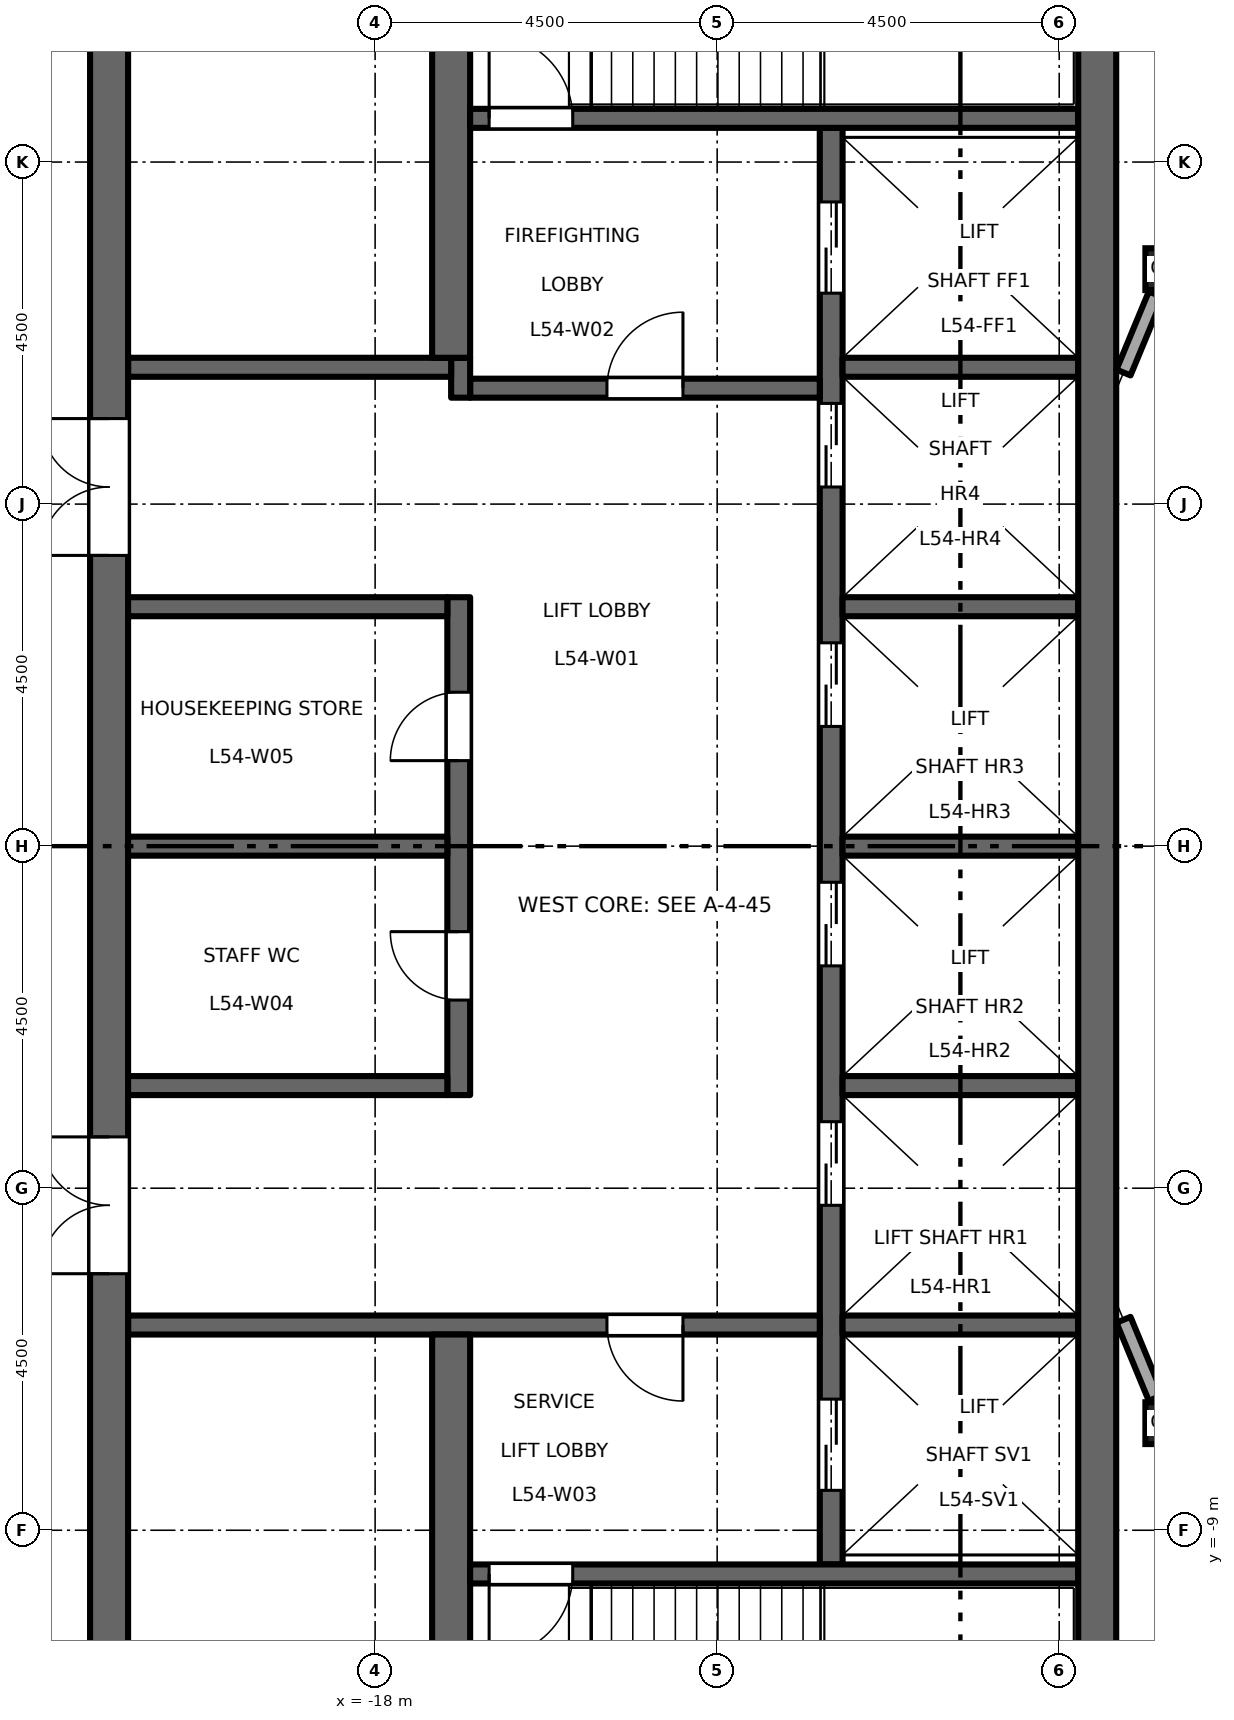
"""IFC4 building model, lengths in metres.
Left out: names, types, materials, properties, quantities, classifications, styles, units other than length and angle.
Written with IfcOpenShell. Run it as: python <this file> out.ifc"""

import sys

from ifc_helpers import new_model, si_unit, direction, frame, frame_2d, origin, origin_2d, place, context, subcontext, project, spatial, rectangle, hollow_rectangle, extrude, element, fill, save


model = new_model("IFC4")
c1 = context("Model", 3, precision=1e-05, world=origin(), true_north=direction((0.0, 1.0)))
c2 = subcontext(c1, "Body", "Model", "MODEL_VIEW")
j1 = project(units=[si_unit("LENGTHUNIT", "METRE"), si_unit("PLANEANGLEUNIT", "RADIAN")], contexts=[c1])
p1 = place(None, origin())
s1 = spatial("IfcSite", under=j1, at=p1, CompositionType="ELEMENT")
p2 = place(p1, origin())
s2 = spatial("IfcBuilding", under=s1, at=p2, CompositionType="ELEMENT")
p3 = place(p2, frame((0.0, 0.0, 251.2)))
s3 = spatial("IfcBuildingStorey", under=s2, at=p3, CompositionType="ELEMENT", Elevation=251.2)
for number, where, z_axis, x_axis in (
    (1, (-7.591, -7.591, 0.0), (0.0, 0.0, 1.0), (1.0, 0.0, 0.0)),
    (2, (-7.591, 7.591, 0.0), (0.0, 0.0, 1.0), (1.0, 0.0, 0.0)),
):
    element("IfcColumn", number, at=place(p3, frame(where, z_axis=z_axis, x_axis=x_axis)), inside=s3, PredefinedType="COLUMN", context=c2, shape_type="SweptSolid", body=[
        extrude(hollow_rectangle(XDim=0.55, YDim=0.55, WallThickness=0.028, at=origin_2d()), origin(), (0.0, 0.0, 1.0), 4.5),
    ])
p4 = place(p3, frame((-12.0, -9.45, 0.0), z_axis=(0.0, 0.0, 1.0), x_axis=(0.0, 1.0, 0.0)))
e3 = element("IfcWall", 3, at=p4, inside=s3, PredefinedType="SHEAR", context=c2, shape_type="SweptSolid", body=[
    extrude(rectangle(XDim=18.9, YDim=0.3, at=frame_2d((9.45, 0.0))), origin(), (0.0, 0.0, 1.0), 4.35),
])
p5 = place(p4, frame((4.725, 0.0, 0.0)))
e4 = element("IfcOpeningElement", 4, at=p5, cuts=e3, PredefinedType="OPENING", context=c2, shape_type="SweptSolid", body=[
    extrude(rectangle(XDim=1.1, YDim=2.1, at=frame_2d((0.55, 1.05))), frame((0.0, 0.16, 0.0), z_axis=(0.0, -1.0, 0.0), x_axis=(1.0, 0.0, 0.0)), (0.0, 0.0, 1.0), 0.32),
])
p6 = place(p4, frame((7.875, 0.0, 0.0)))
e5 = element("IfcOpeningElement", 5, at=p6, cuts=e3, PredefinedType="OPENING", context=c2, shape_type="SweptSolid", body=[
    extrude(rectangle(XDim=1.1, YDim=2.1, at=frame_2d((0.55, 1.05))), frame((0.0, 0.16, 0.0), z_axis=(0.0, -1.0, 0.0), x_axis=(1.0, 0.0, 0.0)), (0.0, 0.0, 1.0), 0.32),
])
p7 = place(p4, frame((11.025, 0.0, 0.0)))
e6 = element("IfcOpeningElement", 6, at=p7, cuts=e3, PredefinedType="OPENING", context=c2, shape_type="SweptSolid", body=[
    extrude(rectangle(XDim=1.1, YDim=2.1, at=frame_2d((0.55, 1.05))), frame((0.0, 0.16, 0.0), z_axis=(0.0, -1.0, 0.0), x_axis=(1.0, 0.0, 0.0)), (0.0, 0.0, 1.0), 0.32),
])
p8 = place(p4, frame((14.175, 0.0, 0.0)))
e7 = element("IfcOpeningElement", 7, at=p8, cuts=e3, PredefinedType="OPENING", context=c2, shape_type="SweptSolid", body=[
    extrude(rectangle(XDim=1.1, YDim=2.1, at=frame_2d((0.55, 1.05))), frame((0.0, 0.16, 0.0), z_axis=(0.0, -1.0, 0.0), x_axis=(1.0, 0.0, 0.0)), (0.0, 0.0, 1.0), 0.32),
])
p9 = place(p4, frame((16.725, 0.0, 0.0)))
e8 = element("IfcOpeningElement", 8, at=p9, cuts=e3, PredefinedType="OPENING", context=c2, shape_type="SweptSolid", body=[
    extrude(rectangle(XDim=1.2, YDim=2.1, at=frame_2d((0.6, 1.05))), frame((0.0, 0.16, 0.0), z_axis=(0.0, -1.0, 0.0), x_axis=(1.0, 0.0, 0.0)), (0.0, 0.0, 1.0), 0.32),
])
p10 = place(p4, frame((0.975, 0.0, 0.0)))
e9 = element("IfcOpeningElement", 9, at=p10, cuts=e3, PredefinedType="OPENING", context=c2, shape_type="SweptSolid", body=[
    extrude(rectangle(XDim=1.2, YDim=2.1, at=frame_2d((0.6, 1.05))), frame((0.0, 0.16, 0.0), z_axis=(0.0, -1.0, 0.0), x_axis=(1.0, 0.0, 0.0)), (0.0, 0.0, 1.0), 0.32),
])
p11 = place(p3, frame((-12.15, 6.025, 0.0), z_axis=(0.0, 0.0, 1.0), x_axis=(-1.0, 0.0, 0.0)))
e10 = element("IfcWall", 10, at=p11, inside=s3, PredefinedType="SHEAR", context=c2, shape_type="SweptSolid", body=[
    extrude(rectangle(XDim=4.6, YDim=0.25, at=frame_2d((2.3, 0.0))), origin(), (0.0, 0.0, 1.0), 4.35),
])
p12 = place(p11, frame((1.8, 0.0, 0.0)))
e11 = element("IfcOpeningElement", 11, at=p12, cuts=e10, PredefinedType="OPENING", context=c2, shape_type="SweptSolid", body=[
    extrude(rectangle(XDim=1.0, YDim=2.1, at=frame_2d((0.5, 1.05))), frame((0.0, 0.135, 0.0), z_axis=(0.0, -1.0, 0.0), x_axis=(1.0, 0.0, 0.0)), (0.0, 0.0, 1.0), 0.27),
])
p13 = place(p3, frame((-16.875, 5.9, 0.0), z_axis=(0.0, 0.0, 1.0), x_axis=(0.0, 1.0, 0.0)))
e12 = element("IfcWall", 12, at=p13, inside=s3, PredefinedType="SHEAR", context=c2, shape_type="SweptSolid", body=[
    extrude(rectangle(XDim=0.525, YDim=0.25, at=frame_2d((0.263, 0.0))), origin(), (0.0, 0.0, 1.0), 4.35),
])
p14 = place(p3, frame((-17.0, 6.3, 0.0), z_axis=(0.0, 0.0, 1.0), x_axis=(-1.0, 0.0, 0.0)))
e13 = element("IfcWall", 13, at=p14, inside=s3, PredefinedType="SHEAR", context=c2, shape_type="SweptSolid", body=[
    extrude(rectangle(XDim=4.25, YDim=0.25, at=frame_2d((2.125, 0.0))), origin(), (0.0, 0.0, 1.0), 4.35),
])
p15 = place(p3, frame((-12.15, -6.3, 0.0), z_axis=(0.0, 0.0, 1.0), x_axis=(-1.0, 0.0, 0.0)))
e14 = element("IfcWall", 14, at=p15, inside=s3, PredefinedType="SHEAR", context=c2, shape_type="SweptSolid", body=[
    extrude(rectangle(XDim=9.1, YDim=0.25, at=frame_2d((4.55, 0.0))), origin(), (0.0, 0.0, 1.0), 4.35),
])
p16 = place(p15, frame((1.8, 0.0, 0.0)))
e15 = element("IfcOpeningElement", 15, at=p16, cuts=e14, PredefinedType="OPENING", context=c2, shape_type="SweptSolid", body=[
    extrude(rectangle(XDim=1.0, YDim=2.1, at=frame_2d((0.5, 1.05))), frame((0.0, 0.135, 0.0), z_axis=(0.0, -1.0, 0.0), x_axis=(1.0, 0.0, 0.0)), (0.0, 0.0, 1.0), 0.27),
])
p17 = place(p3, frame((-21.5, -13.0, 0.0), z_axis=(0.0, 0.0, 1.0), x_axis=(0.0, 1.0, 0.0)))
e16 = element("IfcWall", 16, at=p17, inside=s3, PredefinedType="SHEAR", context=c2, shape_type="SweptSolid", body=[
    extrude(rectangle(XDim=26.0, YDim=0.5, at=frame_2d((13.0, 0.0))), origin(), (0.0, 0.0, 1.0), 4.35),
])
p18 = place(p17, frame((16.825, 0.0, 0.0)))
e17 = element("IfcOpeningElement", 17, at=p18, cuts=e16, PredefinedType="OPENING", context=c2, shape_type="SweptSolid", body=[
    extrude(rectangle(XDim=1.8, YDim=2.1, at=frame_2d((0.9, 1.05))), frame((0.0, 0.26, 0.0), z_axis=(0.0, -1.0, 0.0), x_axis=(1.0, 0.0, 0.0)), (0.0, 0.0, 1.0), 0.52),
])
p19 = place(p17, frame((7.375, 0.0, 0.0)))
e18 = element("IfcOpeningElement", 18, at=p19, cuts=e16, PredefinedType="OPENING", context=c2, shape_type="SweptSolid", body=[
    extrude(rectangle(XDim=1.8, YDim=2.1, at=frame_2d((0.9, 1.05))), frame((0.0, 0.26, 0.0), z_axis=(0.0, -1.0, 0.0), x_axis=(1.0, 0.0, 0.0)), (0.0, 0.0, 1.0), 0.52),
])
p20 = place(p3, frame((-16.9, -3.275, 0.0), z_axis=(0.0, 0.0, 1.0), x_axis=(0.0, 1.0, 0.0)))
e19 = element("IfcWall", 19, at=p20, inside=s3, PredefinedType="SHEAR", context=c2, shape_type="SweptSolid", body=[
    extrude(rectangle(XDim=6.55, YDim=0.3, at=frame_2d((3.275, 0.0))), origin(), (0.0, 0.0, 1.0), 4.35),
])
p21 = place(p20, frame((1.25, 0.0, 0.0)))
e20 = element("IfcOpeningElement", 20, at=p21, cuts=e19, PredefinedType="OPENING", context=c2, shape_type="SweptSolid", body=[
    extrude(rectangle(XDim=0.9, YDim=2.1, at=frame_2d((0.45, 1.05))), frame((0.0, 0.16, 0.0), z_axis=(0.0, -1.0, 0.0), x_axis=(1.0, 0.0, 0.0)), (0.0, 0.0, 1.0), 0.32),
])
p22 = place(p20, frame((4.4, 0.0, 0.0)))
e21 = element("IfcOpeningElement", 21, at=p22, cuts=e19, PredefinedType="OPENING", context=c2, shape_type="SweptSolid", body=[
    extrude(rectangle(XDim=0.9, YDim=2.1, at=frame_2d((0.45, 1.05))), frame((0.0, 0.16, 0.0), z_axis=(0.0, -1.0, 0.0), x_axis=(1.0, 0.0, 0.0)), (0.0, 0.0, 1.0), 0.32),
])
for number, where, z_axis, x_axis in (
    (22, (-17.05, 0.0, 0.0), (0.0, 0.0, 1.0), (-1.0, 0.0, 0.0)),
    (23, (-17.05, 3.15, 0.0), (0.0, 0.0, 1.0), (-1.0, 0.0, 0.0)),
    (24, (-17.05, -3.15, 0.0), (0.0, 0.0, 1.0), (-1.0, 0.0, 0.0)),
):
    element("IfcWall", number, at=place(p3, frame(where, z_axis=z_axis, x_axis=x_axis)), inside=s3, PredefinedType="SHEAR", context=c2, shape_type="SweptSolid", body=[
        extrude(rectangle(XDim=4.2, YDim=0.25, at=frame_2d((2.1, 0.0))), origin(), (0.0, 0.0, 1.0), 4.35),
    ])
for number, where, z_axis, x_axis in (
    (25, (-17.0, 6.425, 0.0), (0.0, 0.0, 1.0), (0.0, 1.0, 0.0)),
    (26, (-17.0, -13.0, 0.0), (0.0, 0.0, 1.0), (0.0, 1.0, 0.0)),
):
    element("IfcWall", number, at=place(p3, frame(where, z_axis=z_axis, x_axis=x_axis)), inside=s3, PredefinedType="SHEAR", context=c2, shape_type="SweptSolid", body=[
        extrude(rectangle(XDim=6.575, YDim=0.5, at=frame_2d((3.288, 0.0))), origin(), (0.0, 0.0, 1.0), 4.35),
    ])
for number, where, z_axis, x_axis in (
    (27, (-8.75, 0.0, 0.0), (0.0, 0.0, 1.0), (-1.0, 0.0, 0.0)),
    (28, (-8.75, 3.15, 0.0), (0.0, 0.0, 1.0), (-1.0, 0.0, 0.0)),
    (29, (-8.75, 6.3, 0.0), (0.0, 0.0, 1.0), (-1.0, 0.0, 0.0)),
    (30, (-8.75, -3.15, 0.0), (0.0, 0.0, 1.0), (-1.0, 0.0, 0.0)),
    (31, (-8.75, -6.3, 0.0), (0.0, 0.0, 1.0), (-1.0, 0.0, 0.0)),
):
    element("IfcWall", number, at=place(p3, frame(where, z_axis=z_axis, x_axis=x_axis)), inside=s3, PredefinedType="SHEAR", context=c2, shape_type="SweptSolid", body=[
        extrude(rectangle(XDim=3.1, YDim=0.25, at=frame_2d((1.55, 0.0))), origin(), (0.0, 0.0, 1.0), 4.35),
    ])
p23 = place(p3, frame((-8.75, 9.575, 0.0), z_axis=(0.0, 0.0, 1.0), x_axis=(-1.0, 0.0, 0.0)))
e32 = element("IfcWall", 32, at=p23, inside=s3, PredefinedType="SHEAR", context=c2, shape_type="SweptSolid", body=[
    extrude(rectangle(XDim=8.0, YDim=0.25, at=frame_2d((4.0, 0.0))), origin(), (0.0, 0.0, 1.0), 4.35),
])
p24 = place(p23, frame((6.65, 0.0, 0.0)))
e33 = element("IfcOpeningElement", 33, at=p24, cuts=e32, PredefinedType="OPENING", context=c2, shape_type="SweptSolid", body=[
    extrude(rectangle(XDim=1.1, YDim=2.1, at=frame_2d((0.55, 1.05))), frame((0.0, 0.135, 0.0), z_axis=(0.0, -1.0, 0.0), x_axis=(1.0, 0.0, 0.0)), (0.0, 0.0, 1.0), 0.27),
])
p25 = place(p3, frame((-8.75, -9.575, 0.0), z_axis=(0.0, 0.0, 1.0), x_axis=(-1.0, 0.0, 0.0)))
e34 = element("IfcWall", 34, at=p25, inside=s3, PredefinedType="SHEAR", context=c2, shape_type="SweptSolid", body=[
    extrude(rectangle(XDim=8.0, YDim=0.25, at=frame_2d((4.0, 0.0))), origin(), (0.0, 0.0, 1.0), 4.35),
])
p26 = place(p25, frame((6.65, 0.0, 0.0)))
e35 = element("IfcOpeningElement", 35, at=p26, cuts=e34, PredefinedType="OPENING", context=c2, shape_type="SweptSolid", body=[
    extrude(rectangle(XDim=1.1, YDim=2.1, at=frame_2d((0.55, 1.05))), frame((0.0, 0.135, 0.0), z_axis=(0.0, -1.0, 0.0), x_axis=(1.0, 0.0, 0.0)), (0.0, 0.0, 1.0), 0.27),
])
p27 = place(p3, frame((-8.5, -13.0, 0.0), z_axis=(0.0, 0.0, 1.0), x_axis=(0.0, 1.0, 0.0)))
e36 = element("IfcWall", 36, at=p27, inside=s3, PredefinedType="SHEAR", context=c2, shape_type="SweptSolid", body=[
    extrude(rectangle(XDim=26.0, YDim=0.5, at=frame_2d((13.0, 0.0))), origin(), (0.0, 0.0, 1.0), 4.35),
])
for number, where, z_axis, x_axis in (
    (37, (-7.729, 7.259, 0.0), (0.0, 0.0, 1.0), (-0.383, -0.924, 0.0)),
    (38, (-8.154, -6.231, 0.0), (0.0, 0.0, 1.0), (0.383, -0.924, 0.0)),
):
    element("IfcWall", number, at=place(p3, frame(where, z_axis=z_axis, x_axis=x_axis)), inside=s3, PredefinedType="STANDARD", context=c2, shape_type="SweptSolid", body=[
        extrude(rectangle(XDim=1.113, YDim=0.2, at=frame_2d((0.556, 0.0))), origin(), (0.0, 0.0, 1.0), 3.918),
    ])
p28 = place(p12, origin())
e39 = element("IfcDoor", 39, at=p28, inside=s3, OperationType="SINGLE_SWING_LEFT", PredefinedType="DOOR", context=c2, shape_type="SweptSolid", body=[
    extrude(rectangle(XDim=1.0, YDim=2.1, at=frame_2d((0.5, 1.05))), frame((0.0, 0.025, 0.0), z_axis=(0.0, -1.0, 0.0), x_axis=(1.0, 0.0, 0.0)), (0.0, 0.0, 1.0), 0.05),
])
fill(e11, e39)
p29 = place(p16, origin())
e40 = element("IfcDoor", 40, at=p29, inside=s3, OperationType="SINGLE_SWING_RIGHT", PredefinedType="DOOR", context=c2, shape_type="SweptSolid", body=[
    extrude(rectangle(XDim=1.0, YDim=2.1, at=frame_2d((0.5, 1.05))), frame((0.0, 0.025, 0.0), z_axis=(0.0, -1.0, 0.0), x_axis=(1.0, 0.0, 0.0)), (0.0, 0.0, 1.0), 0.05),
])
fill(e15, e40)
p30 = place(p24, origin())
e41 = element("IfcDoor", 41, at=p30, inside=s3, OperationType="SINGLE_SWING_RIGHT", PredefinedType="DOOR", context=c2, shape_type="SweptSolid", body=[
    extrude(rectangle(XDim=1.1, YDim=2.1, at=frame_2d((0.55, 1.05))), frame((0.0, 0.025, 0.0), z_axis=(0.0, -1.0, 0.0), x_axis=(1.0, 0.0, 0.0)), (0.0, 0.0, 1.0), 0.05),
])
fill(e33, e41)
p31 = place(p26, origin())
e42 = element("IfcDoor", 42, at=p31, inside=s3, OperationType="SINGLE_SWING_LEFT", PredefinedType="DOOR", context=c2, shape_type="SweptSolid", body=[
    extrude(rectangle(XDim=1.1, YDim=2.1, at=frame_2d((0.55, 1.05))), frame((0.0, 0.025, 0.0), z_axis=(0.0, -1.0, 0.0), x_axis=(1.0, 0.0, 0.0)), (0.0, 0.0, 1.0), 0.05),
])
fill(e35, e42)
p32 = place(p18, origin())
e43 = element("IfcDoor", 43, at=p32, inside=s3, OperationType="DOUBLE_DOOR_DOUBLE_SWING", PredefinedType="DOOR", context=c2, shape_type="SweptSolid", body=[
    extrude(rectangle(XDim=1.8, YDim=2.1, at=frame_2d((0.9, 1.05))), frame((0.0, 0.025, 0.0), z_axis=(0.0, -1.0, 0.0), x_axis=(1.0, 0.0, 0.0)), (0.0, 0.0, 1.0), 0.05),
])
fill(e17, e43)
p33 = place(p19, origin())
e44 = element("IfcDoor", 44, at=p33, inside=s3, OperationType="DOUBLE_DOOR_DOUBLE_SWING", PredefinedType="DOOR", context=c2, shape_type="SweptSolid", body=[
    extrude(rectangle(XDim=1.8, YDim=2.1, at=frame_2d((0.9, 1.05))), frame((0.0, 0.025, 0.0), z_axis=(0.0, -1.0, 0.0), x_axis=(1.0, 0.0, 0.0)), (0.0, 0.0, 1.0), 0.05),
])
fill(e18, e44)
p34 = place(p5, origin())
e45 = element("IfcDoor", 45, at=p34, inside=s3, OperationType="DOUBLE_DOOR_SLIDING", PredefinedType="DOOR", context=c2, shape_type="SweptSolid", body=[
    extrude(rectangle(XDim=1.1, YDim=2.1, at=frame_2d((0.55, 1.05))), frame((0.0, 0.025, 0.0), z_axis=(0.0, -1.0, 0.0), x_axis=(1.0, 0.0, 0.0)), (0.0, 0.0, 1.0), 0.05),
])
fill(e4, e45)
p35 = place(p6, origin())
e46 = element("IfcDoor", 46, at=p35, inside=s3, OperationType="DOUBLE_DOOR_SLIDING", PredefinedType="DOOR", context=c2, shape_type="SweptSolid", body=[
    extrude(rectangle(XDim=1.1, YDim=2.1, at=frame_2d((0.55, 1.05))), frame((0.0, 0.025, 0.0), z_axis=(0.0, -1.0, 0.0), x_axis=(1.0, 0.0, 0.0)), (0.0, 0.0, 1.0), 0.05),
])
fill(e5, e46)
p36 = place(p7, origin())
e47 = element("IfcDoor", 47, at=p36, inside=s3, OperationType="DOUBLE_DOOR_SLIDING", PredefinedType="DOOR", context=c2, shape_type="SweptSolid", body=[
    extrude(rectangle(XDim=1.1, YDim=2.1, at=frame_2d((0.55, 1.05))), frame((0.0, 0.025, 0.0), z_axis=(0.0, -1.0, 0.0), x_axis=(1.0, 0.0, 0.0)), (0.0, 0.0, 1.0), 0.05),
])
fill(e6, e47)
p37 = place(p8, origin())
e48 = element("IfcDoor", 48, at=p37, inside=s3, OperationType="DOUBLE_DOOR_SLIDING", PredefinedType="DOOR", context=c2, shape_type="SweptSolid", body=[
    extrude(rectangle(XDim=1.1, YDim=2.1, at=frame_2d((0.55, 1.05))), frame((0.0, 0.025, 0.0), z_axis=(0.0, -1.0, 0.0), x_axis=(1.0, 0.0, 0.0)), (0.0, 0.0, 1.0), 0.05),
])
fill(e7, e48)
p38 = place(p9, origin())
e49 = element("IfcDoor", 49, at=p38, inside=s3, OperationType="DOUBLE_DOOR_SLIDING", PredefinedType="DOOR", context=c2, shape_type="SweptSolid", body=[
    extrude(rectangle(XDim=1.2, YDim=2.1, at=frame_2d((0.6, 1.05))), frame((0.0, 0.025, 0.0), z_axis=(0.0, -1.0, 0.0), x_axis=(1.0, 0.0, 0.0)), (0.0, 0.0, 1.0), 0.05),
])
fill(e8, e49)
p39 = place(p10, origin())
e50 = element("IfcDoor", 50, at=p39, inside=s3, OperationType="DOUBLE_DOOR_SLIDING", PredefinedType="DOOR", context=c2, shape_type="SweptSolid", body=[
    extrude(rectangle(XDim=1.2, YDim=2.1, at=frame_2d((0.6, 1.05))), frame((0.0, 0.025, 0.0), z_axis=(0.0, -1.0, 0.0), x_axis=(1.0, 0.0, 0.0)), (0.0, 0.0, 1.0), 0.05),
])
fill(e9, e50)
p40 = place(p21, origin())
e51 = element("IfcDoor", 51, at=p40, inside=s3, OperationType="SINGLE_SWING_LEFT", PredefinedType="DOOR", context=c2, shape_type="SweptSolid", body=[
    extrude(rectangle(XDim=0.9, YDim=2.1, at=frame_2d((0.45, 1.05))), frame((0.0, 0.025, 0.0), z_axis=(0.0, -1.0, 0.0), x_axis=(1.0, 0.0, 0.0)), (0.0, 0.0, 1.0), 0.05),
])
fill(e20, e51)
p41 = place(p22, origin())
e52 = element("IfcDoor", 52, at=p41, inside=s3, OperationType="SINGLE_SWING_RIGHT", PredefinedType="DOOR", context=c2, shape_type="SweptSolid", body=[
    extrude(rectangle(XDim=0.9, YDim=2.1, at=frame_2d((0.45, 1.05))), frame((0.0, 0.025, 0.0), z_axis=(0.0, -1.0, 0.0), x_axis=(1.0, 0.0, 0.0)), (0.0, 0.0, 1.0), 0.05),
])
fill(e21, e52)
save(model, sys.argv[1])
